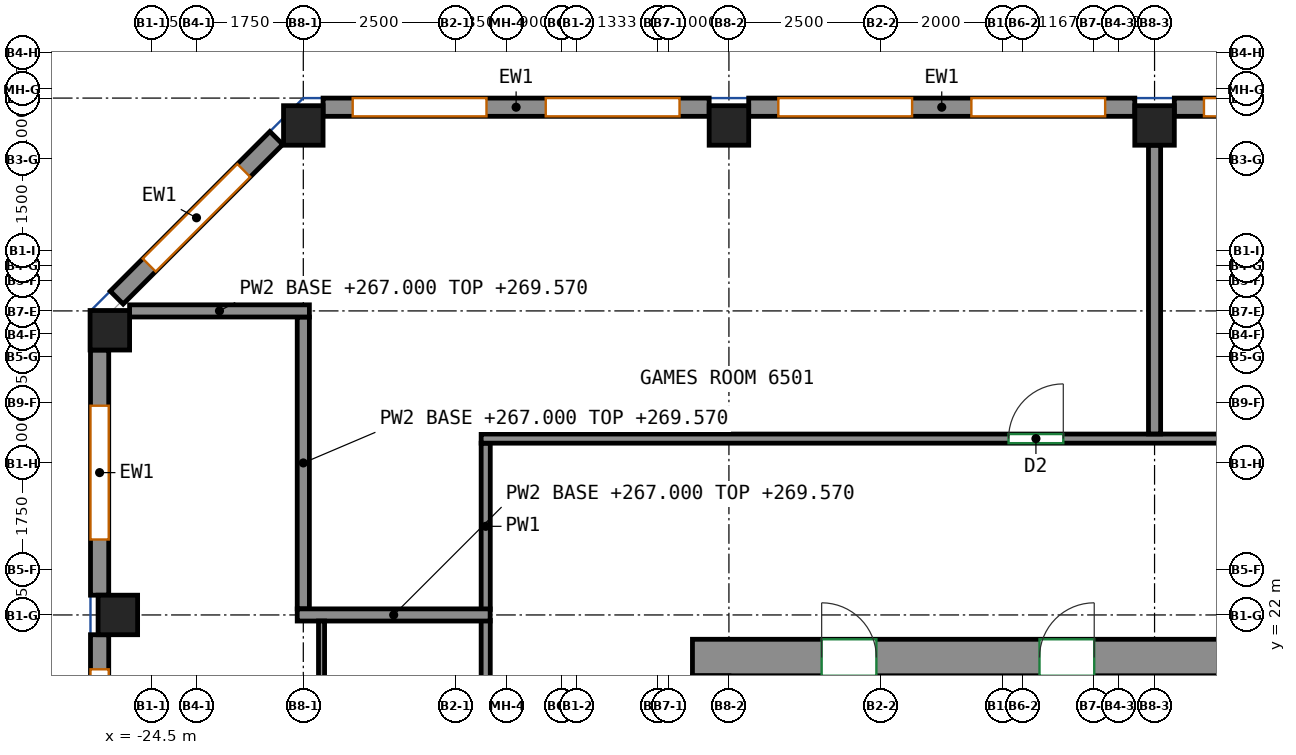
"""IFC4 building model, lengths in metres.
Left out: names, types, materials, properties, quantities, classifications, styles, units other than length and angle.
Written with IfcOpenShell. Run it as: python <this file> out.ifc"""

import sys

from ifc_helpers import new_model, si_unit, direction, frame, frame_2d, origin, origin_2d, place, context, subcontext, project, spatial, rectangle, extrude, source, transform, mapped, element, fill, save


model = new_model("IFC4")
c1 = context("Model", 3, precision=1e-05, world=origin(), true_north=direction((0.0, 1.0)))
c2 = subcontext(c1, "Body", "Model", "MODEL_VIEW")
j1 = project(units=[si_unit("LENGTHUNIT", "METRE"), si_unit("PLANEANGLEUNIT", "RADIAN")], contexts=[c1])
p1 = place(None, origin())
s1 = spatial("IfcSite", under=j1, at=p1, CompositionType="ELEMENT")
p2 = place(p1, origin())
s2 = spatial("IfcBuilding", under=s1, at=p2, CompositionType="ELEMENT")
p3 = place(p2, frame((0.0, 0.0, 267.0)))
s3 = spatial("IfcBuildingStorey", under=s2, at=p3, CompositionType="ELEMENT", Elevation=267.0)
m1 = source(origin(), c2, "Body", "SweptSolid", [
    extrude(rectangle(XDim=0.65, YDim=0.65, at=origin_2d()), origin(), (0.0, 0.0, 1.0), 3.12),
])
for number, where, z_axis, x_axis in (
    (1, (-25.182, 26.682, 0.0), (0.0, 0.0, 1.0), (1.0, 0.0, 0.0)),
    (2, (-25.05, 22.0, 0.0), (0.0, 0.0, 1.0), (1.0, 0.0, 0.0)),
    (3, (-22.0, 30.05, 0.0), (0.0, 0.0, 1.0), (1.0, 0.0, 0.0)),
    (4, (-15.0, 30.05, 0.0), (0.0, 0.0, 1.0), (1.0, 0.0, 0.0)),
    (5, (-8.0, 30.05, 0.0), (0.0, 0.0, 1.0), (1.0, 0.0, 0.0)),
):
    element("IfcColumn", number, at=place(p3, frame(where, z_axis=z_axis, x_axis=x_axis)), inside=s3, PredefinedType="COLUMN", context=c2, shape_type="MappedRepresentation", body=[
        mapped(m1, transform((0.0, 0.0, 0.0))),
    ])
m2 = source(origin(), c2, "Body", "SweptSolid", [
    extrude(rectangle(XDim=33.3, YDim=0.6, at=frame_2d((16.65, 0.0))), origin(), (0.0, 0.0, 1.0), 3.12),
])
p4 = place(p3, frame((-15.6, 21.3, 0.0), z_axis=(0.0, 0.0, 1.0), x_axis=(1.0, 0.0, 0.0)))
e6 = element("IfcWall", 6, at=p4, inside=s3, PredefinedType="SHEAR", context=c2, shape_type="MappedRepresentation", body=[
    mapped(m2, transform((0.0, 0.0, 0.0))),
])
p5 = place(p4, frame((5.708, 0.0, 0.0)))
e7 = element("IfcOpeningElement", 7, at=p5, cuts=e6, PredefinedType="OPENING", context=c2, shape_type="SweptSolid", body=[
    extrude(rectangle(XDim=0.9, YDim=2.1, at=frame_2d((0.45, 1.05))), frame((0.0, 0.31, 0.0), z_axis=(0.0, -1.0, 0.0), x_axis=(1.0, 0.0, 0.0)), (0.0, 0.0, 1.0), 0.62),
])
p6 = place(p4, frame((10.773, 0.0, 0.0)))
e8 = element("IfcOpeningElement", 8, at=p6, cuts=e6, PredefinedType="OPENING", context=c2, shape_type="SweptSolid", body=[
    extrude(rectangle(XDim=0.9, YDim=2.1, at=frame_2d((0.45, 1.05))), frame((0.0, 0.31, 0.0), z_axis=(0.0, -1.0, 0.0), x_axis=(1.0, 0.0, 0.0)), (0.0, 0.0, 1.0), 0.62),
])
p7 = place(p4, frame((15.838, 0.0, 0.0)))
e9 = element("IfcOpeningElement", 9, at=p7, cuts=e6, PredefinedType="OPENING", context=c2, shape_type="SweptSolid", body=[
    extrude(rectangle(XDim=0.9, YDim=2.1, at=frame_2d((0.45, 1.05))), frame((0.0, 0.31, 0.0), z_axis=(0.0, -1.0, 0.0), x_axis=(1.0, 0.0, 0.0)), (0.0, 0.0, 1.0), 0.62),
])
p8 = place(p4, frame((21.493, 0.0, 0.0)))
e10 = element("IfcOpeningElement", 10, at=p8, cuts=e6, PredefinedType="OPENING", context=c2, shape_type="SweptSolid", body=[
    extrude(rectangle(XDim=0.9, YDim=2.1, at=frame_2d((0.45, 1.05))), frame((0.0, 0.31, 0.0), z_axis=(0.0, -1.0, 0.0), x_axis=(1.0, 0.0, 0.0)), (0.0, 0.0, 1.0), 0.62),
])
p9 = place(p4, frame((26.92, 0.0, 0.0)))
e11 = element("IfcOpeningElement", 11, at=p9, cuts=e6, PredefinedType="OPENING", context=c2, shape_type="SweptSolid", body=[
    extrude(rectangle(XDim=0.9, YDim=2.1, at=frame_2d((0.45, 1.05))), frame((0.0, 0.31, 0.0), z_axis=(0.0, -1.0, 0.0), x_axis=(1.0, 0.0, 0.0)), (0.0, 0.0, 1.0), 0.62),
])
p10 = place(p4, frame((2.125, 0.0, 0.0)))
e12 = element("IfcOpeningElement", 12, at=p10, cuts=e6, PredefinedType="OPENING", context=c2, shape_type="SweptSolid", body=[
    extrude(rectangle(XDim=0.9, YDim=2.1, at=frame_2d((0.45, 1.05))), frame((0.0, 0.31, 0.0), z_axis=(0.0, -1.0, 0.0), x_axis=(1.0, 0.0, 0.0)), (0.0, 0.0, 1.0), 0.62),
])
p11 = place(p4, frame((30.275, 0.0, 0.0)))
e13 = element("IfcOpeningElement", 13, at=p11, cuts=e6, PredefinedType="OPENING", context=c2, shape_type="SweptSolid", body=[
    extrude(rectangle(XDim=0.9, YDim=2.1, at=frame_2d((0.45, 1.05))), frame((0.0, 0.31, 0.0), z_axis=(0.0, -1.0, 0.0), x_axis=(1.0, 0.0, 0.0)), (0.0, 0.0, 1.0), 0.62),
])
m3 = source(origin(), c2, "Body", "SweptSolid", [
    extrude(rectangle(XDim=6.35, YDim=0.3, at=frame_2d((3.175, 0.0))), origin(), (0.0, 0.0, 1.0), 3.12),
])
p12 = place(p3, frame((-1.325, 30.35, 0.0), z_axis=(0.0, 0.0, 1.0), x_axis=(-1.0, 0.0, 0.0)))
e14 = element("IfcWall", 14, at=p12, inside=s3, PredefinedType="SOLIDWALL", context=c2, shape_type="MappedRepresentation", body=[
    mapped(m3, transform((0.0, 0.0, 0.0))),
])
p13 = place(p12, frame((0.488, 0.0, 0.8)))
e15 = element("IfcOpeningElement", 15, at=p13, cuts=e14, PredefinedType="OPENING", context=c2, shape_type="SweptSolid", body=[
    extrude(rectangle(XDim=2.2, YDim=2.05, at=frame_2d((1.1, 1.025))), frame((0.0, 0.16, 0.0), z_axis=(0.0, -1.0, 0.0), x_axis=(1.0, 0.0, 0.0)), (0.0, 0.0, 1.0), 0.32),
])
p14 = place(p12, frame((3.663, 0.0, 0.8)))
e16 = element("IfcOpeningElement", 16, at=p14, cuts=e14, PredefinedType="OPENING", context=c2, shape_type="SweptSolid", body=[
    extrude(rectangle(XDim=2.2, YDim=2.05, at=frame_2d((1.1, 1.025))), frame((0.0, 0.16, 0.0), z_axis=(0.0, -1.0, 0.0), x_axis=(1.0, 0.0, 0.0)), (0.0, 0.0, 1.0), 0.32),
])
p15 = place(p3, frame((-8.325, 30.35, 0.0), z_axis=(0.0, 0.0, 1.0), x_axis=(-1.0, 0.0, 0.0)))
e17 = element("IfcWall", 17, at=p15, inside=s3, PredefinedType="SOLIDWALL", context=c2, shape_type="MappedRepresentation", body=[
    mapped(m3, transform((0.0, 0.0, 0.0))),
])
p16 = place(p15, frame((0.488, 0.0, 0.8)))
e18 = element("IfcOpeningElement", 18, at=p16, cuts=e17, PredefinedType="OPENING", context=c2, shape_type="SweptSolid", body=[
    extrude(rectangle(XDim=2.2, YDim=2.05, at=frame_2d((1.1, 1.025))), frame((0.0, 0.16, 0.0), z_axis=(0.0, -1.0, 0.0), x_axis=(1.0, 0.0, 0.0)), (0.0, 0.0, 1.0), 0.32),
])
p17 = place(p15, frame((3.663, 0.0, 0.8)))
e19 = element("IfcOpeningElement", 19, at=p17, cuts=e17, PredefinedType="OPENING", context=c2, shape_type="SweptSolid", body=[
    extrude(rectangle(XDim=2.2, YDim=2.05, at=frame_2d((1.1, 1.025))), frame((0.0, 0.16, 0.0), z_axis=(0.0, -1.0, 0.0), x_axis=(1.0, 0.0, 0.0)), (0.0, 0.0, 1.0), 0.32),
])
p18 = place(p3, frame((-15.325, 30.35, 0.0), z_axis=(0.0, 0.0, 1.0), x_axis=(-1.0, 0.0, 0.0)))
e20 = element("IfcWall", 20, at=p18, inside=s3, PredefinedType="SOLIDWALL", context=c2, shape_type="MappedRepresentation", body=[
    mapped(m3, transform((0.0, 0.0, 0.0))),
])
p19 = place(p18, frame((0.488, 0.0, 0.8)))
e21 = element("IfcOpeningElement", 21, at=p19, cuts=e20, PredefinedType="OPENING", context=c2, shape_type="SweptSolid", body=[
    extrude(rectangle(XDim=2.2, YDim=2.05, at=frame_2d((1.1, 1.025))), frame((0.0, 0.16, 0.0), z_axis=(0.0, -1.0, 0.0), x_axis=(1.0, 0.0, 0.0)), (0.0, 0.0, 1.0), 0.32),
])
p20 = place(p18, frame((3.663, 0.0, 0.8)))
e22 = element("IfcOpeningElement", 22, at=p20, cuts=e20, PredefinedType="OPENING", context=c2, shape_type="SweptSolid", body=[
    extrude(rectangle(XDim=2.2, YDim=2.05, at=frame_2d((1.1, 1.025))), frame((0.0, 0.16, 0.0), z_axis=(0.0, -1.0, 0.0), x_axis=(1.0, 0.0, 0.0)), (0.0, 0.0, 1.0), 0.32),
])
m4 = source(origin(), c2, "Body", "SweptSolid", [
    extrude(rectangle(XDim=3.712, YDim=0.3, at=frame_2d((1.856, 0.0))), origin(), (0.0, 0.0, 1.0), 3.12),
])
p21 = place(p3, frame((-22.444, 29.844, 0.0), z_axis=(0.0, 0.0, 1.0), x_axis=(-0.707106781187, -0.707106781187, 0.0)))
e23 = element("IfcWall", 23, at=p21, inside=s3, PredefinedType="SOLIDWALL", context=c2, shape_type="MappedRepresentation", body=[
    mapped(m4, transform((0.0, 0.0, 0.0))),
])
p22 = place(p21, frame((0.756, 0.0, 0.8)))
e24 = element("IfcOpeningElement", 24, at=p22, cuts=e23, PredefinedType="OPENING", context=c2, shape_type="SweptSolid", body=[
    extrude(rectangle(XDim=2.2, YDim=2.05, at=frame_2d((1.1, 1.025))), frame((0.0, 0.16, 0.0), z_axis=(0.0, -1.0, 0.0), x_axis=(1.0, 0.0, 0.0)), (0.0, 0.0, 1.0), 0.32),
])
m5 = source(origin(), c2, "Body", "SweptSolid", [
    extrude(rectangle(XDim=4.032, YDim=0.3, at=frame_2d((2.016, 0.0))), origin(), (0.0, 0.0, 1.0), 3.12),
])
p23 = place(p3, frame((-25.35, 26.357, 0.0), z_axis=(0.0, 0.0, 1.0), x_axis=(0.0, -1.0, 0.0)))
e25 = element("IfcWall", 25, at=p23, inside=s3, PredefinedType="SOLIDWALL", context=c2, shape_type="MappedRepresentation", body=[
    mapped(m5, transform((0.0, 0.0, 0.0))),
])
p24 = place(p23, frame((0.916, 0.0, 0.8)))
e26 = element("IfcOpeningElement", 26, at=p24, cuts=e25, PredefinedType="OPENING", context=c2, shape_type="SweptSolid", body=[
    extrude(rectangle(XDim=2.2, YDim=2.05, at=frame_2d((1.1, 1.025))), frame((0.0, 0.16, 0.0), z_axis=(0.0, -1.0, 0.0), x_axis=(1.0, 0.0, 0.0)), (0.0, 0.0, 1.0), 0.32),
])
m6 = source(origin(), c2, "Body", "SweptSolid", [
    extrude(rectangle(XDim=13.35, YDim=0.3, at=frame_2d((6.675, 0.0))), origin(), (0.0, 0.0, 1.0), 3.12),
])
p25 = place(p3, frame((-25.35, 21.675, 0.0), z_axis=(0.0, 0.0, 1.0), x_axis=(0.0, -1.0, 0.0)))
e27 = element("IfcWall", 27, at=p25, inside=s3, PredefinedType="SOLIDWALL", context=c2, shape_type="MappedRepresentation", body=[
    mapped(m6, transform((0.0, 0.0, 0.0))),
])
p26 = place(p25, frame((0.569, 0.0, 0.8)))
e28 = element("IfcOpeningElement", 28, at=p26, cuts=e27, PredefinedType="OPENING", context=c2, shape_type="SweptSolid", body=[
    extrude(rectangle(XDim=2.2, YDim=2.05, at=frame_2d((1.1, 1.025))), frame((0.0, 0.16, 0.0), z_axis=(0.0, -1.0, 0.0), x_axis=(1.0, 0.0, 0.0)), (0.0, 0.0, 1.0), 0.32),
])
p27 = place(p25, frame((3.906, 0.0, 0.8)))
e29 = element("IfcOpeningElement", 29, at=p27, cuts=e27, PredefinedType="OPENING", context=c2, shape_type="SweptSolid", body=[
    extrude(rectangle(XDim=2.2, YDim=2.05, at=frame_2d((1.1, 1.025))), frame((0.0, 0.16, 0.0), z_axis=(0.0, -1.0, 0.0), x_axis=(1.0, 0.0, 0.0)), (0.0, 0.0, 1.0), 0.32),
])
p28 = place(p25, frame((7.244, 0.0, 0.8)))
e30 = element("IfcOpeningElement", 30, at=p28, cuts=e27, PredefinedType="OPENING", context=c2, shape_type="SweptSolid", body=[
    extrude(rectangle(XDim=2.2, YDim=2.05, at=frame_2d((1.1, 1.025))), frame((0.0, 0.16, 0.0), z_axis=(0.0, -1.0, 0.0), x_axis=(1.0, 0.0, 0.0)), (0.0, 0.0, 1.0), 0.32),
])
p29 = place(p25, frame((10.581, 0.0, 0.8)))
e31 = element("IfcOpeningElement", 31, at=p29, cuts=e27, PredefinedType="OPENING", context=c2, shape_type="SweptSolid", body=[
    extrude(rectangle(XDim=2.2, YDim=2.05, at=frame_2d((1.1, 1.025))), frame((0.0, 0.16, 0.0), z_axis=(0.0, -1.0, 0.0), x_axis=(1.0, 0.0, 0.0)), (0.0, 0.0, 1.0), 0.32),
])
p30 = place(p3, frame((-19.0, 22.09, 0.0), z_axis=(0.0, 0.0, 1.0), x_axis=(0.0, 1.0, 0.0)))
e32 = element("IfcWall", 32, at=p30, inside=s3, PredefinedType="PARTITIONING", context=c2, shape_type="SweptSolid", body=[
    extrude(rectangle(XDim=2.735, YDim=0.15, at=frame_2d((1.367, 0.0))), origin(), (0.0, 0.0, 1.0), 3.12),
])
p31 = place(p3, frame((-19.075, 24.9, 0.0), z_axis=(0.0, 0.0, 1.0), x_axis=(1.0, 0.0, 0.0)))
e33 = element("IfcWall", 33, at=p31, inside=s3, PredefinedType="PARTITIONING", context=c2, shape_type="SweptSolid", body=[
    extrude(rectangle(XDim=39.75, YDim=0.15, at=frame_2d((19.875, 0.0))), origin(), (0.0, 0.0, 1.0), 3.12),
])
p32 = place(p31, frame((8.674, 0.0, 0.0)))
e34 = element("IfcOpeningElement", 34, at=p32, cuts=e33, PredefinedType="OPENING", context=c2, shape_type="SweptSolid", body=[
    extrude(rectangle(XDim=0.9, YDim=2.1, at=frame_2d((0.45, 1.05))), frame((0.0, 0.085, 0.0), z_axis=(0.0, -1.0, 0.0), x_axis=(1.0, 0.0, 0.0)), (0.0, 0.0, 1.0), 0.17),
])
p33 = place(p31, frame((13.778, 0.0, 0.0)))
e35 = element("IfcOpeningElement", 35, at=p33, cuts=e33, PredefinedType="OPENING", context=c2, shape_type="SweptSolid", body=[
    extrude(rectangle(XDim=0.9, YDim=2.1, at=frame_2d((0.45, 1.05))), frame((0.0, 0.085, 0.0), z_axis=(0.0, -1.0, 0.0), x_axis=(1.0, 0.0, 0.0)), (0.0, 0.0, 1.0), 0.17),
])
p34 = place(p3, frame((-19.0, 17.28, 0.0), z_axis=(0.0, 0.0, 1.0), x_axis=(0.0, 1.0, 0.0)))
e36 = element("IfcWall", 36, at=p34, inside=s3, PredefinedType="PARTITIONING", context=c2, shape_type="SweptSolid", body=[
    extrude(rectangle(XDim=4.63, YDim=0.15, at=frame_2d((2.315, 0.0))), origin(), (0.0, 0.0, 1.0), 3.12),
])
p35 = place(p3, frame((-8.0, 29.725, 0.0), z_axis=(0.0, 0.0, 1.0), x_axis=(0.0, -1.0, 0.0)))
e37 = element("IfcWall", 37, at=p35, inside=s3, PredefinedType="PARTITIONING", context=c2, shape_type="SweptSolid", body=[
    extrude(rectangle(XDim=4.748, YDim=0.2, at=frame_2d((2.374, 0.0))), origin(), (0.0, 0.0, 1.0), 3.12),
])
p36 = place(p3, frame((-22.0, 22.1, 0.0), z_axis=(0.0, 0.0, 1.0), x_axis=(0.0, 1.0, 0.0)))
e38 = element("IfcWall", 38, at=p36, inside=s3, PredefinedType="PARTITIONING", context=c2, shape_type="SweptSolid", body=[
    extrude(rectangle(XDim=4.8, YDim=0.2, at=frame_2d((2.4, 0.0))), origin(), (0.0, 0.0, 1.0), 2.57),
])
p37 = place(p3, frame((-24.857, 27.0, 0.0), z_axis=(0.0, 0.0, 1.0), x_axis=(1.0, 0.0, 0.0)))
e39 = element("IfcWall", 39, at=p37, inside=s3, PredefinedType="PARTITIONING", context=c2, shape_type="SweptSolid", body=[
    extrude(rectangle(XDim=2.957, YDim=0.2, at=frame_2d((1.479, 0.0))), origin(), (0.0, 0.0, 1.0), 2.57),
])
p38 = place(p3, frame((-22.1, 22.0, 0.0), z_axis=(0.0, 0.0, 1.0), x_axis=(1.0, 0.0, 0.0)))
e40 = element("IfcWall", 40, at=p38, inside=s3, PredefinedType="PARTITIONING", context=c2, shape_type="SweptSolid", body=[
    extrude(rectangle(XDim=3.173, YDim=0.2, at=frame_2d((1.586, 0.0))), origin(), (0.0, 0.0, 1.0), 2.57),
])
p39 = place(p3, frame((-21.7, 19.281, 0.0), z_axis=(0.0, 0.0, 1.0), x_axis=(0.0, 1.0, 0.0)))
e41 = element("IfcWall", 41, at=p39, inside=s3, PredefinedType="PARTITIONING", context=c2, shape_type="SweptSolid", body=[
    extrude(rectangle(XDim=2.619, YDim=0.1, at=frame_2d((1.31, 0.0))), origin(), (0.0, 0.0, 1.0), 2.57),
])
p40 = place(p14, origin())
e42 = element("IfcWindow", 42, at=p40, inside=s3, PartitioningType="SINGLE_PANEL", PredefinedType="WINDOW", context=c2, shape_type="SweptSolid", body=[
    extrude(rectangle(XDim=2.2, YDim=2.05, at=frame_2d((1.1, 1.025))), frame((0.0, 0.03, 0.0), z_axis=(0.0, -1.0, 0.0), x_axis=(1.0, 0.0, 0.0)), (0.0, 0.0, 1.0), 0.06),
])
fill(e16, e42)
p41 = place(p16, origin())
e43 = element("IfcWindow", 43, at=p41, inside=s3, PartitioningType="SINGLE_PANEL", PredefinedType="WINDOW", context=c2, shape_type="SweptSolid", body=[
    extrude(rectangle(XDim=2.2, YDim=2.05, at=frame_2d((1.1, 1.025))), frame((0.0, 0.03, 0.0), z_axis=(0.0, -1.0, 0.0), x_axis=(1.0, 0.0, 0.0)), (0.0, 0.0, 1.0), 0.06),
])
fill(e18, e43)
p42 = place(p17, origin())
e44 = element("IfcWindow", 44, at=p42, inside=s3, PartitioningType="SINGLE_PANEL", PredefinedType="WINDOW", context=c2, shape_type="SweptSolid", body=[
    extrude(rectangle(XDim=2.2, YDim=2.05, at=frame_2d((1.1, 1.025))), frame((0.0, 0.03, 0.0), z_axis=(0.0, -1.0, 0.0), x_axis=(1.0, 0.0, 0.0)), (0.0, 0.0, 1.0), 0.06),
])
fill(e19, e44)
p43 = place(p19, origin())
e45 = element("IfcWindow", 45, at=p43, inside=s3, PartitioningType="SINGLE_PANEL", PredefinedType="WINDOW", context=c2, shape_type="SweptSolid", body=[
    extrude(rectangle(XDim=2.2, YDim=2.05, at=frame_2d((1.1, 1.025))), frame((0.0, 0.03, 0.0), z_axis=(0.0, -1.0, 0.0), x_axis=(1.0, 0.0, 0.0)), (0.0, 0.0, 1.0), 0.06),
])
fill(e21, e45)
p44 = place(p20, origin())
e46 = element("IfcWindow", 46, at=p44, inside=s3, PartitioningType="SINGLE_PANEL", PredefinedType="WINDOW", context=c2, shape_type="SweptSolid", body=[
    extrude(rectangle(XDim=2.2, YDim=2.05, at=frame_2d((1.1, 1.025))), frame((0.0, 0.03, 0.0), z_axis=(0.0, -1.0, 0.0), x_axis=(1.0, 0.0, 0.0)), (0.0, 0.0, 1.0), 0.06),
])
fill(e22, e46)
p45 = place(p22, origin())
e47 = element("IfcWindow", 47, at=p45, inside=s3, PartitioningType="SINGLE_PANEL", PredefinedType="WINDOW", context=c2, shape_type="SweptSolid", body=[
    extrude(rectangle(XDim=2.2, YDim=2.05, at=frame_2d((1.1, 1.025))), frame((0.0, 0.03, 0.0), z_axis=(0.0, -1.0, 0.0), x_axis=(1.0, 0.0, 0.0)), (0.0, 0.0, 1.0), 0.06),
])
fill(e24, e47)
p46 = place(p24, origin())
e48 = element("IfcWindow", 48, at=p46, inside=s3, PartitioningType="SINGLE_PANEL", PredefinedType="WINDOW", context=c2, shape_type="SweptSolid", body=[
    extrude(rectangle(XDim=2.2, YDim=2.05, at=frame_2d((1.1, 1.025))), frame((0.0, 0.03, 0.0), z_axis=(0.0, -1.0, 0.0), x_axis=(1.0, 0.0, 0.0)), (0.0, 0.0, 1.0), 0.06),
])
fill(e26, e48)
p47 = place(p26, origin())
e49 = element("IfcWindow", 49, at=p47, inside=s3, PartitioningType="SINGLE_PANEL", PredefinedType="WINDOW", context=c2, shape_type="SweptSolid", body=[
    extrude(rectangle(XDim=2.2, YDim=2.05, at=frame_2d((1.1, 1.025))), frame((0.0, 0.03, 0.0), z_axis=(0.0, -1.0, 0.0), x_axis=(1.0, 0.0, 0.0)), (0.0, 0.0, 1.0), 0.06),
])
fill(e28, e49)
p48 = place(p5, origin())
e50 = element("IfcDoor", 50, at=p48, inside=s3, OperationType="SINGLE_SWING_RIGHT", PredefinedType="DOOR", context=c2, shape_type="SweptSolid", body=[
    extrude(rectangle(XDim=0.9, YDim=2.1, at=frame_2d((0.45, 1.05))), frame((0.0, -0.155, 0.0), z_axis=(0.0, -1.0, 0.0), x_axis=(1.0, 0.0, 0.0)), (0.0, 0.0, 1.0), 0.05),
])
fill(e7, e50)
p49 = place(p10, origin())
e51 = element("IfcDoor", 51, at=p49, inside=s3, OperationType="SINGLE_SWING_LEFT", PredefinedType="DOOR", context=c2, shape_type="SweptSolid", body=[
    extrude(rectangle(XDim=0.9, YDim=2.1, at=frame_2d((0.45, 1.05))), frame((0.0, -0.155, 0.0), z_axis=(0.0, -1.0, 0.0), x_axis=(1.0, 0.0, 0.0)), (0.0, 0.0, 1.0), 0.05),
])
fill(e12, e51)
p50 = place(p32, origin())
e52 = element("IfcDoor", 52, at=p50, inside=s3, OperationType="SINGLE_SWING_RIGHT", PredefinedType="DOOR", context=c2, shape_type="SweptSolid", body=[
    extrude(rectangle(XDim=0.9, YDim=2.1, at=frame_2d((0.45, 1.05))), frame((0.0, 0.025, 0.0), z_axis=(0.0, -1.0, 0.0), x_axis=(1.0, 0.0, 0.0)), (0.0, 0.0, 1.0), 0.05),
])
fill(e34, e52)
save(model, sys.argv[1])
